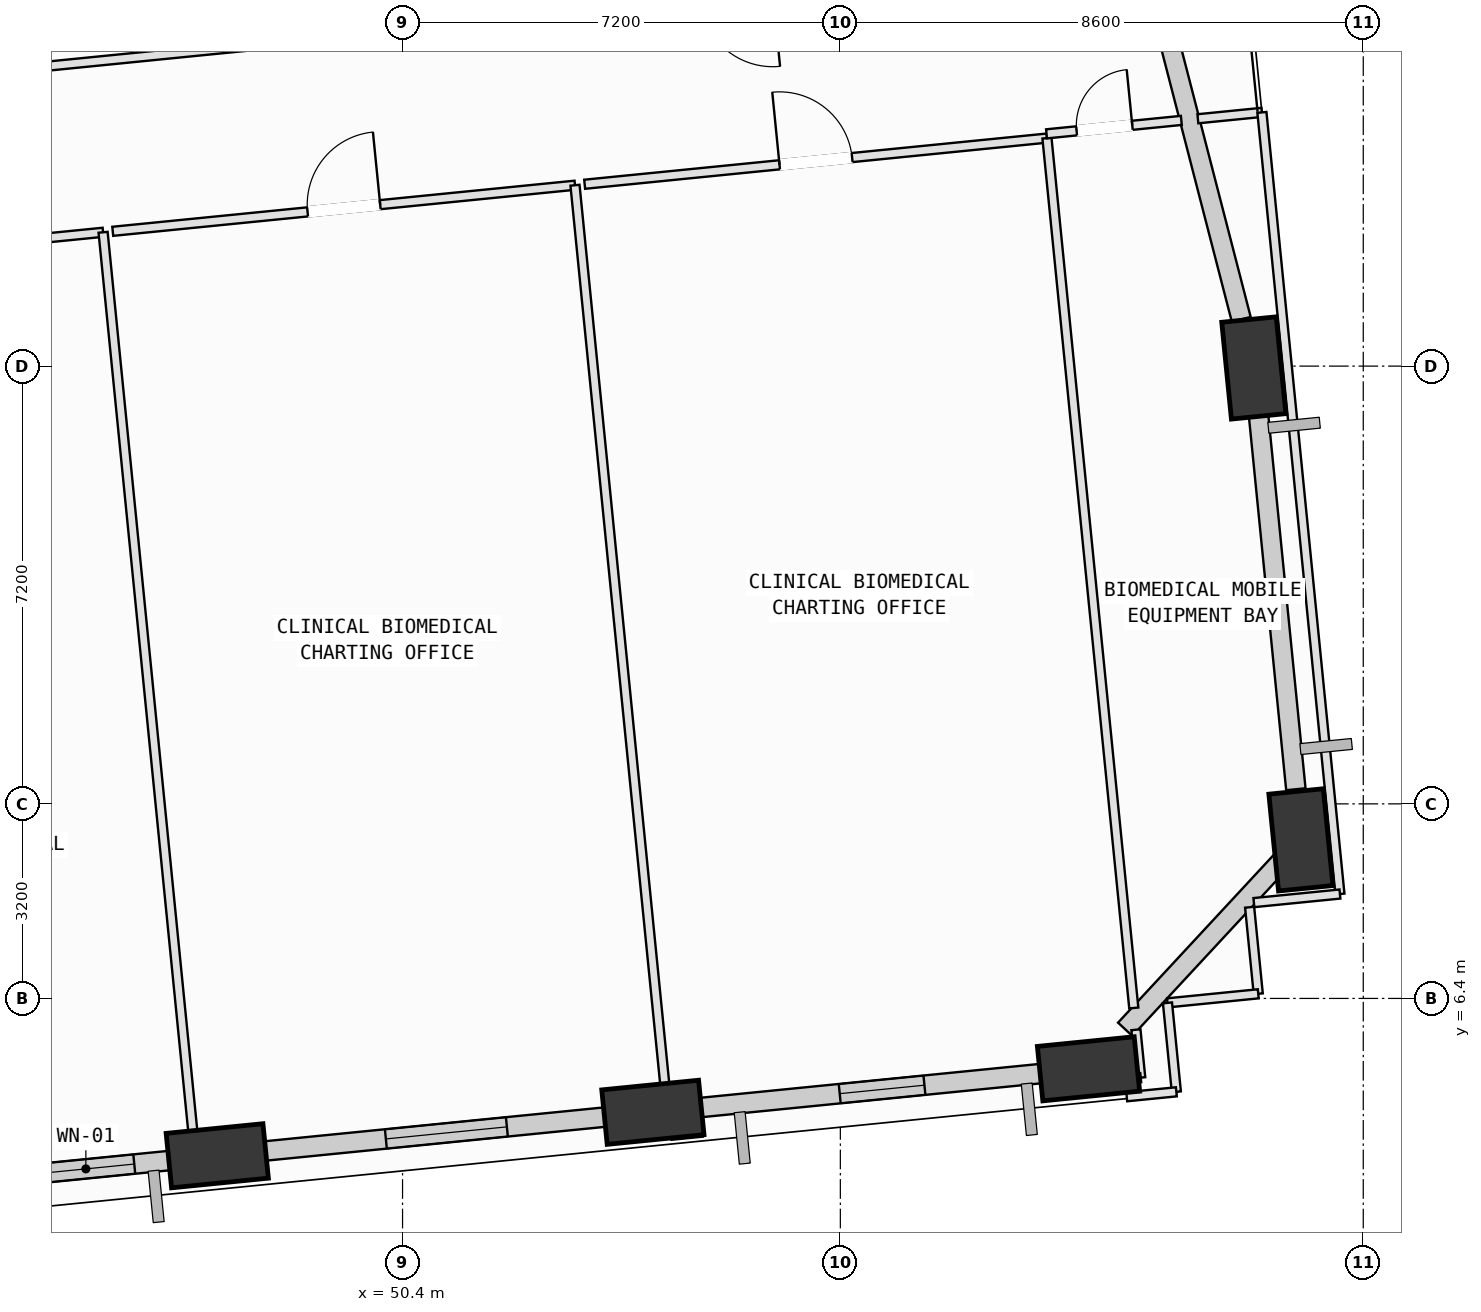
"""IFC4 building model, lengths in metres.
Left out: names, types, materials, properties, quantities, classifications, styles, units other than length and angle.
Written with IfcOpenShell. Run it as: python <this file> out.ifc"""

import sys

from ifc_helpers import new_model, si_unit, direction, frame, frame_2d, origin, origin_2d, place, context, subcontext, project, spatial, rectangle, extrude, element, fill, save


model = new_model("IFC4")
c1 = context("Model", 3, precision=1e-05, world=origin(), true_north=direction((0.0, 1.0)))
c2 = subcontext(c1, "Body", "Model", "MODEL_VIEW")
j1 = project(units=[si_unit("LENGTHUNIT", "METRE"), si_unit("PLANEANGLEUNIT", "RADIAN")], contexts=[c1])
p1 = place(None, origin())
s1 = spatial("IfcSite", under=j1, at=p1, CompositionType="ELEMENT")
p2 = place(p1, origin())
s2 = spatial("IfcBuilding", under=s1, at=p2, CompositionType="ELEMENT")
p3 = place(p2, frame((0.0, 0.0, 47.0)))
s3 = spatial("IfcBuildingStorey", under=s2, at=p3, CompositionType="ELEMENT", Elevation=47.0)
p4 = place(p3, frame((47.353, 3.812, 0.002), z_axis=(0.086035721767, 0.057417907535, 0.994636133706), x_axis=(-0.634531084789, 0.772829064842, 0.010273216236)))
e1 = element("IfcColumn", 1, at=p4, inside=s3, PredefinedType="COLUMN", context=c2, shape_type="SweptSolid", body=[
    extrude(rectangle(XDim=1.6, YDim=0.9, at=origin_2d()), origin(), (0.0, 0.0, 1.0), 4.018),
])
p5 = place(p3, frame((54.517, 4.527, 0.002), z_axis=(0.082722113319, 0.086785442932, 0.992786653246), x_axis=(-0.788302317086, 0.615172869434, 0.011907879312)))
e2 = element("IfcColumn", 2, at=p5, inside=s3, PredefinedType="COLUMN", context=c2, shape_type="SweptSolid", body=[
    extrude(rectangle(XDim=1.6, YDim=0.9, at=origin_2d()), origin(), (0.0, 0.0, 1.0), 4.026),
])
p6 = place(p3, frame((61.681, 5.242, 0.002), z_axis=(0.07929154135, 0.115943466642, 0.99008583669), x_axis=(-0.876862698798, 0.480538429513, 0.013950814218)))
e3 = element("IfcColumn", 3, at=p6, inside=s3, PredefinedType="COLUMN", context=c2, shape_type="SweptSolid", body=[
    extrude(rectangle(XDim=1.6, YDim=0.9, at=origin_2d()), origin(), (0.0, 0.0, 1.0), 4.037),
])
p7 = place(p3, frame((65.175, 9.008, 0.002), z_axis=(0.063646955424, 0.13007430966, 0.989459316512), x_axis=(-0.343521573183, -0.928024529362, 0.144095113241)))
e4 = element("IfcColumn", 4, at=p7, inside=s3, PredefinedType="COLUMN", context=c2, shape_type="SweptSolid", body=[
    extrude(rectangle(XDim=1.6, YDim=0.9, at=origin_2d()), origin(), (0.0, 0.0, 1.0), 4.039),
])
p8 = place(p3, frame((64.4, 16.77, 0.002), z_axis=(0.031977073991, 0.126818168441, 0.991410418995), x_axis=(-0.144892280872, -0.980851456835, 0.130140872017)))
e5 = element("IfcColumn", 5, at=p8, inside=s3, PredefinedType="COLUMN", context=c2, shape_type="SweptSolid", body=[
    extrude(rectangle(XDim=1.6, YDim=0.9, at=origin_2d()), origin(), (0.0, 0.0, 1.0), 4.031),
])
p9 = place(p3, frame((46.938, 3.771, 0.0), z_axis=(0.0, 0.0, 1.0), x_axis=(-0.995059489142, -0.099280476769, 0.0)))
e6 = element("IfcWall", 6, at=p9, inside=s3, PredefinedType="SOLIDWALL", context=c2, shape_type="SweptSolid", body=[
    extrude(rectangle(XDim=3.357, YDim=0.32, at=frame_2d((1.678, 0.0))), origin(), (0.0, 0.0, 1.0), 3.145),
])
p10 = place(p9, frame((0.955, 0.0, 0.75)))
e7 = element("IfcOpeningElement", 7, at=p10, cuts=e6, PredefinedType="OPENING", context=c2, shape_type="SweptSolid", body=[
    extrude(rectangle(XDim=1.6, YDim=1.95, at=frame_2d((0.8, 0.975))), frame((0.0, 0.17, 0.0), z_axis=(0.0, -1.0, 0.0), x_axis=(1.0, 0.0, 0.0)), (0.0, 0.0, 1.0), 0.34),
])
p11 = place(p3, frame((54.115, 4.487, 0.0), z_axis=(0.0, 0.0, 1.0), x_axis=(-0.99505526564, -0.099322798603, 0.0)))
e8 = element("IfcWall", 8, at=p11, inside=s3, PredefinedType="SOLIDWALL", context=c2, shape_type="SweptSolid", body=[
    extrude(rectangle(XDim=6.012, YDim=0.32, at=frame_2d((3.006, 0.0))), origin(), (0.0, 0.0, 1.0), 2.865),
])
p12 = place(p11, frame((2.009, 0.0, 0.75)))
e9 = element("IfcOpeningElement", 9, at=p12, cuts=e8, PredefinedType="OPENING", context=c2, shape_type="SweptSolid", body=[
    extrude(rectangle(XDim=2.0, YDim=1.95, at=frame_2d((1.0, 0.975))), frame((0.0, 0.17, 0.0), z_axis=(0.0, -1.0, 0.0), x_axis=(1.0, 0.0, 0.0)), (0.0, 0.0, 1.0), 0.34),
])
p13 = place(p3, frame((61.298, 5.204, 0.0), z_axis=(0.0, 0.0, 1.0), x_axis=(-0.99505556879, -0.099319761473, 0.0)))
e10 = element("IfcWall", 10, at=p13, inside=s3, PredefinedType="SOLIDWALL", context=c2, shape_type="SweptSolid", body=[
    extrude(rectangle(XDim=6.044, YDim=0.32, at=frame_2d((3.022, 0.0))), origin(), (0.0, 0.0, 1.0), 2.865),
])
p14 = place(p13, frame((2.327, 0.0, 0.75)))
e11 = element("IfcOpeningElement", 11, at=p14, cuts=e10, PredefinedType="OPENING", context=c2, shape_type="SweptSolid", body=[
    extrude(rectangle(XDim=1.4, YDim=1.85, at=frame_2d((0.7, 0.925))), frame((0.0, 0.17, 0.0), z_axis=(0.0, -1.0, 0.0), x_axis=(1.0, 0.0, 0.0)), (0.0, 0.0, 1.0), 0.34),
])
p15 = place(p3, frame((64.956, 8.772, 0.0), z_axis=(0.0, 0.0, 1.0), x_axis=(-0.680098153136, -0.733121069197, 0.0)))
e12 = element("IfcWall", 12, at=p15, inside=s3, PredefinedType="SOLIDWALL", context=c2, shape_type="SweptSolid", body=[
    extrude(rectangle(XDim=3.927, YDim=0.32, at=frame_2d((1.964, 0.0))), origin(), (0.0, 0.0, 1.0), 3.165),
])
p16 = place(p3, frame((64.435, 16.418, 0.0), z_axis=(0.0, 0.0, 1.0), x_axis=(0.099317215684, -0.995055822891, 0.0)))
e13 = element("IfcWall", 13, at=p16, inside=s3, PredefinedType="SOLIDWALL", context=c2, shape_type="SweptSolid", body=[
    extrude(rectangle(XDim=6.61, YDim=0.32, at=frame_2d((3.305, 0.0))), origin(), (0.0, 0.0, 1.0), 3.165),
])
p17 = place(p3, frame((62.038, 25.909, 0.0), z_axis=(0.0, 0.0, 1.0), x_axis=(0.250203731226, -0.968193210512, 0.0)))
e14 = element("IfcWall", 14, at=p17, inside=s3, PredefinedType="SOLIDWALL", context=c2, shape_type="SweptSolid", body=[
    extrude(rectangle(XDim=8.614, YDim=0.32, at=frame_2d((4.307, 0.0))), origin(), (0.0, 0.0, 1.0), 3.165),
])
p18 = place(p3, frame((38.03, 18.258, 0.0), z_axis=(0.0, 0.0, 1.0), x_axis=(0.995058167689, 0.099293720422, 0.0)))
e15 = element("IfcWall", 15, at=p18, inside=s3, PredefinedType="PARTITIONING", context=c2, shape_type="SweptSolid", body=[
    extrude(rectangle(XDim=7.482, YDim=0.15, at=frame_2d((3.741, 0.0))), origin(), (0.0, 0.0, 1.0), 3.78),
])
p19 = place(p18, frame((3.141, 0.0, 0.0)))
e16 = element("IfcOpeningElement", 16, at=p19, cuts=e15, PredefinedType="OPENING", context=c2, shape_type="SweptSolid", body=[
    extrude(rectangle(XDim=1.2, YDim=2.15, at=frame_2d((0.6, 1.075))), frame((0.0, 0.085, 0.0), z_axis=(0.0, -1.0, 0.0), x_axis=(1.0, 0.0, 0.0)), (0.0, 0.0, 1.0), 0.17),
])
p20 = place(p3, frame((45.475, 19.001, 0.0), z_axis=(0.0, 0.0, 1.0), x_axis=(0.099277568745, -0.995059779282, 0.0)))
e17 = element("IfcWall", 17, at=p20, inside=s3, PredefinedType="PARTITIONING", context=c2, shape_type="SweptSolid", body=[
    extrude(rectangle(XDim=15.178, YDim=0.15, at=frame_2d((7.589, 0.0))), origin(), (0.0, 0.0, 1.0), 3.78),
])
p21 = place(p3, frame((45.634, 19.017, 0.0), z_axis=(0.0, 0.0, 1.0), x_axis=(0.995068149401, 0.099193639146, 0.0)))
e18 = element("IfcWall", 18, at=p21, inside=s3, PredefinedType="PARTITIONING", context=c2, shape_type="SweptSolid", body=[
    extrude(rectangle(XDim=7.64, YDim=0.15, at=frame_2d((3.82, 0.0))), origin(), (0.0, 0.0, 1.0), 3.78),
])
p22 = place(p21, frame((3.22, 0.0, 0.0)))
e19 = element("IfcOpeningElement", 19, at=p22, cuts=e18, PredefinedType="OPENING", context=c2, shape_type="SweptSolid", body=[
    extrude(rectangle(XDim=1.2, YDim=2.15, at=frame_2d((0.6, 1.075))), frame((0.0, 0.085, 0.0), z_axis=(0.0, -1.0, 0.0), x_axis=(1.0, 0.0, 0.0)), (0.0, 0.0, 1.0), 0.17),
])
p23 = place(p3, frame((53.236, 19.775, 0.0), z_axis=(0.0, 0.0, 1.0), x_axis=(0.099355848427, -0.995051966172, 0.0)))
e20 = element("IfcWall", 20, at=p23, inside=s3, PredefinedType="PARTITIONING", context=c2, shape_type="SweptSolid", body=[
    extrude(rectangle(XDim=15.53, YDim=0.15, at=frame_2d((7.765, 0.0))), origin(), (0.0, 0.0, 1.0), 3.78),
])
p24 = place(p3, frame((54.779, 4.322, 0.0), z_axis=(0.0, 0.0, 1.0), x_axis=(-0.995059675203, -0.09927861192, 0.0)))
e21 = element("IfcWall", 21, at=p24, inside=s3, PredefinedType="PARTITIONING", context=c2, shape_type="SweptSolid", body=[
    extrude(rectangle(XDim=0.644, YDim=0.15, at=frame_2d((0.322, 0.0))), origin(), (0.0, 0.0, 1.0), 3.78),
])
p25 = place(p3, frame((48.155, 3.661, 0.0), z_axis=(0.0, 0.0, 1.0), x_axis=(-0.99503719021, -0.099503719021, 0.0)))
e22 = element("IfcWall", 22, at=p25, inside=s3, PredefinedType="PARTITIONING", context=c2, shape_type="SweptSolid", body=[
    extrude(rectangle(XDim=0.984, YDim=0.15, at=frame_2d((0.492, 0.0))), origin(), (0.0, 0.0, 1.0), 3.145),
])
p26 = place(p3, frame((53.395, 19.791, 0.0), z_axis=(0.0, 0.0, 1.0), x_axis=(0.995053627219, 0.09933921158, 0.0)))
e23 = element("IfcWall", 23, at=p26, inside=s3, PredefinedType="PARTITIONING", context=c2, shape_type="SweptSolid", body=[
    extrude(rectangle(XDim=7.641, YDim=0.15, at=frame_2d((3.82, 0.0))), origin(), (0.0, 0.0, 1.0), 3.78),
])
p27 = place(p26, frame((3.22, 0.0, 0.0)))
e24 = element("IfcOpeningElement", 24, at=p27, cuts=e23, PredefinedType="OPENING", context=c2, shape_type="SweptSolid", body=[
    extrude(rectangle(XDim=1.2, YDim=2.15, at=frame_2d((0.6, 1.075))), frame((0.0, 0.085, 0.0), z_axis=(0.0, -1.0, 0.0), x_axis=(1.0, 0.0, 0.0)), (0.0, 0.0, 1.0), 0.17),
])
p28 = place(p3, frame((60.998, 20.55, 0.0), z_axis=(0.0, 0.0, 1.0), x_axis=(0.099315425298, -0.995056001589, 0.0)))
e25 = element("IfcWall", 25, at=p28, inside=s3, PredefinedType="PARTITIONING", context=c2, shape_type="SweptSolid", body=[
    extrude(rectangle(XDim=14.378, YDim=0.15, at=frame_2d((7.189, 0.0))), origin(), (0.0, 0.0, 1.0), 3.78),
])
p29 = place(p3, frame((62.461, 5.885, 0.0), z_axis=(0.0, 0.0, 1.0), x_axis=(0.099869938679, -0.995000500175, 0.0)))
e26 = element("IfcWall", 26, at=p29, inside=s3, PredefinedType="PARTITIONING", context=c2, shape_type="SweptSolid", body=[
    extrude(rectangle(XDim=0.792, YDim=0.15, at=frame_2d((0.396, 0.0))), origin(), (0.0, 0.0, 1.0), 3.78),
])
p30 = place(p3, frame((62.54, 5.097, 0.0), z_axis=(0.0, 0.0, 1.0), x_axis=(-0.995043107884, -0.099444524501, 0.0)))
e27 = element("IfcWall", 27, at=p30, inside=s3, PredefinedType="PARTITIONING", context=c2, shape_type="SweptSolid", body=[
    extrude(rectangle(XDim=1.225, YDim=0.15, at=frame_2d((0.613, 0.0))), origin(), (0.0, 0.0, 1.0), 3.78),
])
p31 = place(p3, frame((49.152, 22.192, 0.0), z_axis=(0.0, 0.0, 1.0), x_axis=(-0.995051810564, -0.099357406838, 0.0)))
e28 = element("IfcWall", 28, at=p31, inside=s3, PredefinedType="PARTITIONING", context=c2, shape_type="SweptSolid", body=[
    extrude(rectangle(XDim=14.704, YDim=0.15, at=frame_2d((7.352, 0.0))), origin(), (0.0, 0.0, 1.0), 3.78),
])
p32 = place(p31, frame((6.752, 0.0, 0.0)))
e29 = element("IfcOpeningElement", 29, at=p32, cuts=e28, PredefinedType="OPENING", context=c2, shape_type="SweptSolid", body=[
    extrude(rectangle(XDim=1.2, YDim=2.15, at=frame_2d((0.6, 1.075))), frame((0.0, 0.085, 0.0), z_axis=(0.0, -1.0, 0.0), x_axis=(1.0, 0.0, 0.0)), (0.0, 0.0, 1.0), 0.17),
])
p33 = place(p3, frame((64.331, 7.9, 0.0), z_axis=(0.0, 0.0, 1.0), x_axis=(0.099132057666, -0.995074286243, 0.0)))
e30 = element("IfcWall", 30, at=p33, inside=s3, PredefinedType="PARTITIONING", context=c2, shape_type="SweptSolid", body=[
    extrude(rectangle(XDim=1.431, YDim=0.15, at=frame_2d((0.715, 0.0))), origin(), (0.0, 0.0, 1.0), 3.78),
])
p34 = place(p3, frame((64.473, 6.476, 0.0), z_axis=(0.0, 0.0, 1.0), x_axis=(-0.995045242495, -0.099423163232, 0.0)))
e31 = element("IfcWall", 31, at=p34, inside=s3, PredefinedType="PARTITIONING", context=c2, shape_type="SweptSolid", body=[
    extrude(rectangle(XDim=1.5, YDim=0.15, at=frame_2d((0.75, 0.0))), origin(), (0.0, 0.0, 1.0), 3.78),
])
p35 = place(p3, frame((62.98, 6.327, 0.0), z_axis=(0.0, 0.0, 1.0), x_axis=(0.099306413022, -0.995056901053, 0.0)))
e32 = element("IfcWall", 32, at=p35, inside=s3, PredefinedType="PARTITIONING", context=c2, shape_type="SweptSolid", body=[
    extrude(rectangle(XDim=1.47, YDim=0.15, at=frame_2d((0.735, 0.0))), origin(), (0.0, 0.0, 1.0), 3.78),
])
p36 = place(p3, frame((63.126, 4.864, 0.0), z_axis=(0.0, 0.0, 1.0), x_axis=(-0.99510183666, -0.09885511962, 0.0)))
e33 = element("IfcWall", 33, at=p36, inside=s3, PredefinedType="PARTITIONING", context=c2, shape_type="SweptSolid", body=[
    extrude(rectangle(XDim=0.82, YDim=0.15, at=frame_2d((0.41, 0.0))), origin(), (0.0, 0.0, 1.0), 3.78),
])
p37 = place(p3, frame((60.991, 20.62, 0.0), z_axis=(0.0, 0.0, 1.0), x_axis=(0.995070765983, 0.099167387206, 0.0)))
e34 = element("IfcWall", 34, at=p37, inside=s3, PredefinedType="PARTITIONING", context=c2, shape_type="SweptSolid", body=[
    extrude(rectangle(XDim=2.228, YDim=0.15, at=frame_2d((1.114, 0.0))), origin(), (0.0, 0.0, 1.0), 3.78),
])
p38 = place(p37, frame((0.497, 0.0, 0.0)))
e35 = element("IfcOpeningElement", 35, at=p38, cuts=e34, PredefinedType="OPENING", context=c2, shape_type="SweptSolid", body=[
    extrude(rectangle(XDim=0.92, YDim=2.1, at=frame_2d((0.46, 1.05))), frame((0.0, 0.085, 0.0), z_axis=(0.0, -1.0, 0.0), x_axis=(1.0, 0.0, 0.0)), (0.0, 0.0, 1.0), 0.17),
])
p39 = place(p3, frame((63.48, 20.868, 0.0), z_axis=(0.0, 0.0, 1.0), x_axis=(0.995066841681, 0.099206756764, 0.0)))
e36 = element("IfcWall", 36, at=p39, inside=s3, PredefinedType="PARTITIONING", context=c2, shape_type="SweptSolid", body=[
    extrude(rectangle(XDim=1.058, YDim=0.15, at=frame_2d((0.529, 0.0))), origin(), (0.0, 0.0, 1.0), 3.78),
])
p40 = place(p3, frame((64.533, 20.973, 0.0), z_axis=(0.0, 0.0, 1.0), x_axis=(0.099301654273, -0.995057375963, 0.0)))
e37 = element("IfcWall", 37, at=p40, inside=s3, PredefinedType="PARTITIONING", context=c2, shape_type="SweptSolid", body=[
    extrude(rectangle(XDim=12.92, YDim=0.15, at=frame_2d((6.46, 0.0))), origin(), (0.0, 0.0, 1.0), 3.165),
])
p41 = place(p3, frame((65.816, 8.117, 0.0), z_axis=(0.0, 0.0, 1.0), x_axis=(-0.995081287977, -0.099061750028, 0.0)))
e38 = element("IfcWall", 38, at=p41, inside=s3, PredefinedType="PARTITIONING", context=c2, shape_type="SweptSolid", body=[
    extrude(rectangle(XDim=1.422, YDim=0.15, at=frame_2d((0.711, 0.0))), origin(), (0.0, 0.0, 1.0), 3.78),
])
p42 = place(p10, origin())
e39 = element("IfcWindow", 39, at=p42, inside=s3, PartitioningType="SINGLE_PANEL", PredefinedType="WINDOW", context=c2, shape_type="SweptSolid", body=[
    extrude(rectangle(XDim=1.6, YDim=1.95, at=frame_2d((0.8, 0.975))), frame((0.0, 0.03, 0.0), z_axis=(0.0, -1.0, 0.0), x_axis=(1.0, 0.0, 0.0)), (0.0, 0.0, 1.0), 0.06),
])
fill(e7, e39)
p43 = place(p12, origin())
e40 = element("IfcWindow", 40, at=p43, inside=s3, PartitioningType="SINGLE_PANEL", PredefinedType="WINDOW", context=c2, shape_type="SweptSolid", body=[
    extrude(rectangle(XDim=2.0, YDim=1.95, at=frame_2d((1.0, 0.975))), frame((0.0, 0.03, 0.0), z_axis=(0.0, -1.0, 0.0), x_axis=(1.0, 0.0, 0.0)), (0.0, 0.0, 1.0), 0.06),
])
fill(e9, e40)
p44 = place(p14, origin())
e41 = element("IfcWindow", 41, at=p44, inside=s3, PartitioningType="SINGLE_PANEL", PredefinedType="WINDOW", context=c2, shape_type="SweptSolid", body=[
    extrude(rectangle(XDim=1.4, YDim=1.85, at=frame_2d((0.7, 0.925))), frame((0.0, 0.03, 0.0), z_axis=(0.0, -1.0, 0.0), x_axis=(1.0, 0.0, 0.0)), (0.0, 0.0, 1.0), 0.06),
])
fill(e11, e41)
p45 = place(p22, origin())
e42 = element("IfcDoor", 42, at=p45, inside=s3, OperationType="SINGLE_SWING_RIGHT", PredefinedType="DOOR", context=c2, shape_type="SweptSolid", body=[
    extrude(rectangle(XDim=1.2, YDim=2.15, at=frame_2d((0.6, 1.075))), frame((0.0, 0.025, 0.0), z_axis=(0.0, -1.0, 0.0), x_axis=(1.0, 0.0, 0.0)), (0.0, 0.0, 1.0), 0.05),
])
fill(e19, e42)
p46 = place(p27, origin())
e43 = element("IfcDoor", 43, at=p46, inside=s3, OperationType="SINGLE_SWING_LEFT", PredefinedType="DOOR", context=c2, shape_type="SweptSolid", body=[
    extrude(rectangle(XDim=1.2, YDim=2.15, at=frame_2d((0.6, 1.075))), frame((0.0, 0.025, 0.0), z_axis=(0.0, -1.0, 0.0), x_axis=(1.0, 0.0, 0.0)), (0.0, 0.0, 1.0), 0.05),
])
fill(e24, e43)
p47 = place(p38, origin())
e44 = element("IfcDoor", 44, at=p47, inside=s3, OperationType="SINGLE_SWING_RIGHT", PredefinedType="DOOR", context=c2, shape_type="SweptSolid", body=[
    extrude(rectangle(XDim=0.92, YDim=2.1, at=frame_2d((0.46, 1.05))), frame((0.0, 0.025, 0.0), z_axis=(0.0, -1.0, 0.0), x_axis=(1.0, 0.0, 0.0)), (0.0, 0.0, 1.0), 0.05),
])
fill(e35, e44)
save(model, sys.argv[1])
